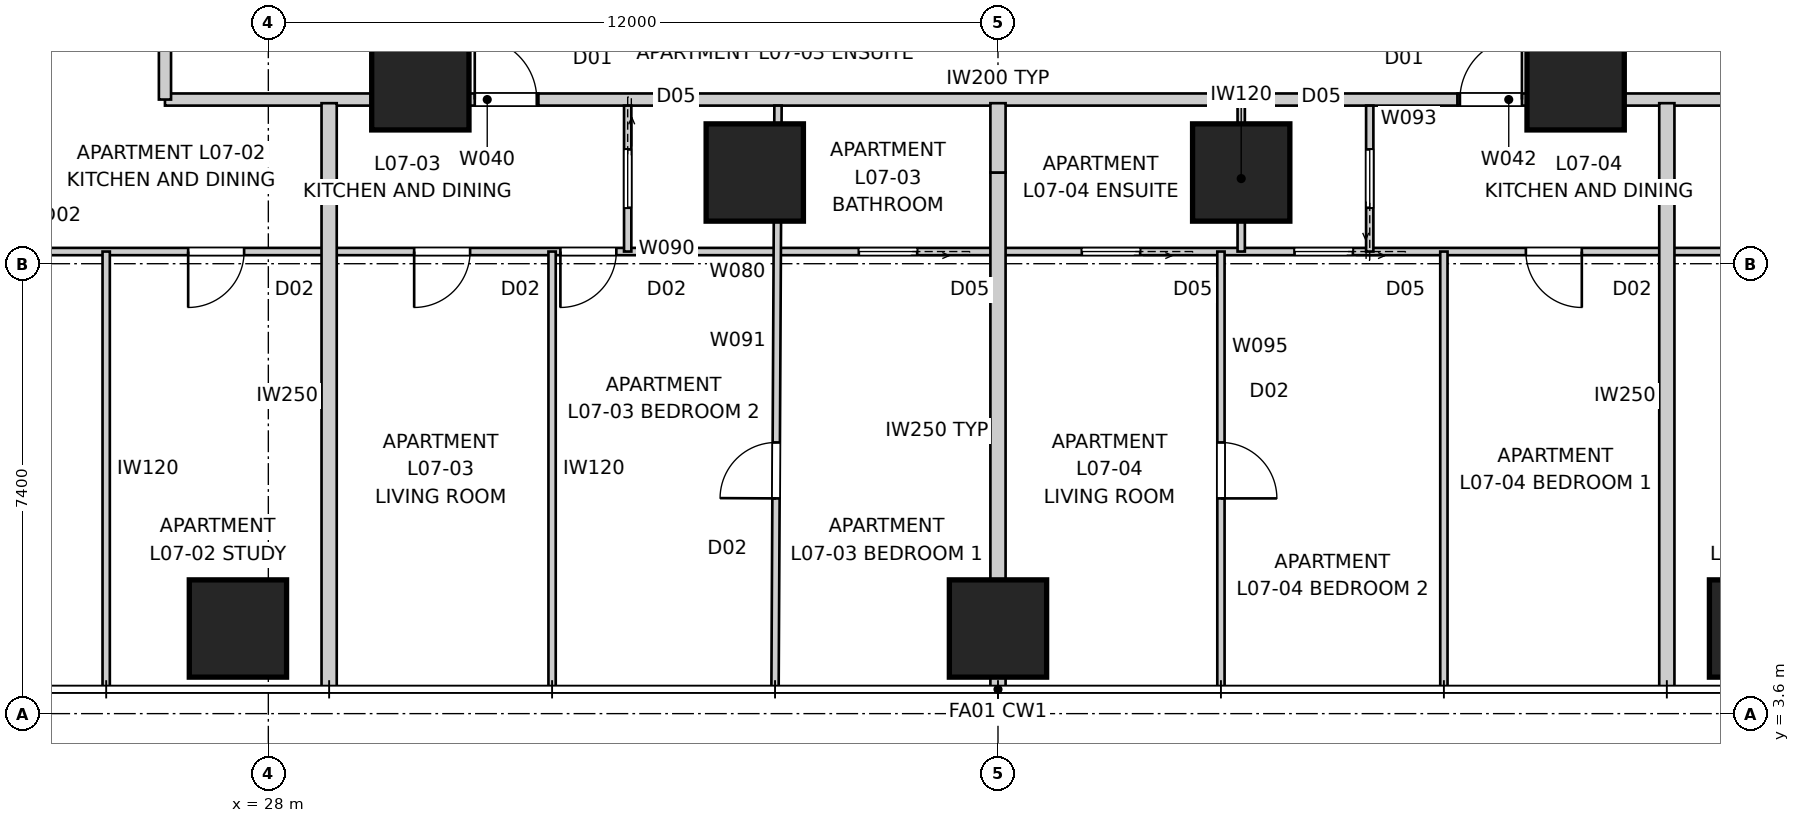
"""IFC4 building model, lengths in metres.
Left out: names, types, materials, properties, quantities, classifications, styles, units other than length and angle.
Written with IfcOpenShell. Run it as: python <this file> out.ifc"""

import sys

from ifc_helpers import new_model, si_unit, direction, frame, frame_2d, origin, origin_2d, place, context, subcontext, project, spatial, rectangle, extrude, element, fill, save


model = new_model("IFC4")
c1 = context("Model", 3, precision=1e-05, world=origin(), true_north=direction((0.0, 1.0)))
c2 = subcontext(c1, "Body", "Model", "MODEL_VIEW")
j1 = project(units=[si_unit("LENGTHUNIT", "METRE"), si_unit("PLANEANGLEUNIT", "RADIAN")], contexts=[c1])
p1 = place(None, origin())
s1 = spatial("IfcSite", under=j1, at=p1, CompositionType="ELEMENT")
p2 = place(p1, origin())
s2 = spatial("IfcBuilding", under=s1, at=p2, CompositionType="ELEMENT")
p3 = place(p2, frame((0.0, 0.0, 28.6)))
s3 = spatial("IfcBuildingStorey", under=s2, at=p3, CompositionType="ELEMENT", Elevation=28.6)
for number, where, z_axis, x_axis in (
    (1, (27.5, 5.0, 0.0), (0.0, 0.0, 1.0), (1.0, 0.0, 0.0)),
    (2, (40.0, 5.0, 0.0), (0.0, 0.0, 1.0), (1.0, 0.0, 0.0)),
    (3, (52.5, 5.0, 0.0), (0.0, 0.0, 1.0), (1.0, 0.0, 0.0)),
    (4, (30.5, 14.0, 0.0), (0.0, 0.0, 1.0), (1.0, 0.0, 0.0)),
    (5, (36.0, 12.5, 0.0), (0.0, 0.0, 1.0), (1.0, 0.0, 0.0)),
    (6, (44.0, 12.5, 0.0), (0.0, 0.0, 1.0), (1.0, 0.0, 0.0)),
    (7, (49.5, 14.0, 0.0), (0.0, 0.0, 1.0), (1.0, 0.0, 0.0)),
):
    element("IfcColumn", number, at=place(p3, frame(where, z_axis=z_axis, x_axis=x_axis)), inside=s3, PredefinedType="COLUMN", context=c2, shape_type="SweptSolid", body=[
        extrude(rectangle(XDim=1.6, YDim=1.6, at=origin_2d()), origin(), (0.0, 0.0, 1.0), 3.4),
    ])
p4 = place(p3, frame((26.3, 13.7, 0.0), z_axis=(0.0, 0.0, 1.0), x_axis=(1.0, 0.0, 0.0)))
e8 = element("IfcWall", 8, at=p4, inside=s3, PredefinedType="PARTITIONING", context=c2, shape_type="SweptSolid", body=[
    extrude(rectangle(XDim=4.458, YDim=0.2, at=frame_2d((2.229, 0.0))), origin(), (0.0, 0.0, 1.0), 3.25),
])
p5 = place(p3, frame((30.758, 13.7, 0.0), z_axis=(0.0, 0.0, 1.0), x_axis=(1.0, 0.0, 0.0)))
e9 = element("IfcWall", 9, at=p5, inside=s3, PredefinedType="PARTITIONING", context=c2, shape_type="SweptSolid", body=[
    extrude(rectangle(XDim=1.683, YDim=0.2, at=frame_2d((0.842, 0.0))), origin(), (0.0, 0.0, 1.0), 2.55),
])
p6 = place(p5, frame((0.637, 0.0, 0.0)))
e10 = element("IfcOpeningElement", 10, at=p6, cuts=e9, PredefinedType="OPENING", context=c2, shape_type="SweptSolid", body=[
    extrude(rectangle(XDim=1.02, YDim=2.34, at=frame_2d((0.51, 1.17))), frame((0.0, 0.11, 0.0), z_axis=(0.0, -1.0, 0.0), x_axis=(1.0, 0.0, 0.0)), (0.0, 0.0, 1.0), 0.22),
])
p7 = place(p3, frame((32.442, 13.7, 0.0), z_axis=(0.0, 0.0, 1.0), x_axis=(1.0, 0.0, 0.0)))
e11 = element("IfcWall", 11, at=p7, inside=s3, PredefinedType="PARTITIONING", context=c2, shape_type="SweptSolid", body=[
    extrude(rectangle(XDim=15.117, YDim=0.2, at=frame_2d((7.558, 0.0))), origin(), (0.0, 0.0, 1.0), 3.25),
])
p8 = place(p3, frame((47.558, 13.7, 0.0), z_axis=(0.0, 0.0, 1.0), x_axis=(1.0, 0.0, 0.0)))
e12 = element("IfcWall", 12, at=p8, inside=s3, PredefinedType="PARTITIONING", context=c2, shape_type="SweptSolid", body=[
    extrude(rectangle(XDim=1.683, YDim=0.2, at=frame_2d((0.842, 0.0))), origin(), (0.0, 0.0, 1.0), 2.55),
])
p9 = place(p8, frame((0.039, 0.0, 0.0)))
e13 = element("IfcOpeningElement", 13, at=p9, cuts=e12, PredefinedType="OPENING", context=c2, shape_type="SweptSolid", body=[
    extrude(rectangle(XDim=1.02, YDim=2.34, at=frame_2d((0.51, 1.17))), frame((0.0, 0.11, 0.0), z_axis=(0.0, -1.0, 0.0), x_axis=(1.0, 0.0, 0.0)), (0.0, 0.0, 1.0), 0.22),
])
p10 = place(p3, frame((49.242, 13.7, 0.0), z_axis=(0.0, 0.0, 1.0), x_axis=(1.0, 0.0, 0.0)))
e14 = element("IfcWall", 14, at=p10, inside=s3, PredefinedType="PARTITIONING", context=c2, shape_type="SweptSolid", body=[
    extrude(rectangle(XDim=4.458, YDim=0.2, at=frame_2d((2.229, 0.0))), origin(), (0.0, 0.0, 1.0), 3.25),
])
p11 = place(p3, frame((26.3, 46.3, 0.0), z_axis=(0.0, 0.0, 1.0), x_axis=(0.0, -1.0, 0.0)))
e15 = element("IfcWall", 15, at=p11, inside=s3, PredefinedType="PARTITIONING", context=c2, shape_type="SweptSolid", body=[
    extrude(rectangle(XDim=32.6, YDim=0.2, at=frame_2d((16.3, 0.0))), origin(), (0.0, 0.0, 1.0), 3.25),
])
p12 = place(p11, frame((2.315, 0.0, 0.0)))
e16 = element("IfcOpeningElement", 16, at=p12, cuts=e15, PredefinedType="OPENING", context=c2, shape_type="SweptSolid", body=[
    extrude(rectangle(XDim=1.02, YDim=2.34, at=frame_2d((0.51, 1.17))), frame((0.0, 0.11, 0.0), z_axis=(0.0, -1.0, 0.0), x_axis=(1.0, 0.0, 0.0)), (0.0, 0.0, 1.0), 0.22),
])
p13 = place(p11, frame((10.624, 0.0, 0.0)))
e17 = element("IfcOpeningElement", 17, at=p13, cuts=e15, PredefinedType="OPENING", context=c2, shape_type="SweptSolid", body=[
    extrude(rectangle(XDim=1.02, YDim=2.34, at=frame_2d((0.51, 1.17))), frame((0.0, 0.11, 0.0), z_axis=(0.0, -1.0, 0.0), x_axis=(1.0, 0.0, 0.0)), (0.0, 0.0, 1.0), 0.22),
])
p14 = place(p11, frame((17.848, 0.0, 0.0)))
e18 = element("IfcOpeningElement", 18, at=p14, cuts=e15, PredefinedType="OPENING", context=c2, shape_type="SweptSolid", body=[
    extrude(rectangle(XDim=1.02, YDim=2.34, at=frame_2d((0.51, 1.17))), frame((0.0, 0.11, 0.0), z_axis=(0.0, -1.0, 0.0), x_axis=(1.0, 0.0, 0.0)), (0.0, 0.0, 1.0), 0.22),
])
p15 = place(p11, frame((30.516, 0.0, 0.0)))
e19 = element("IfcOpeningElement", 19, at=p15, cuts=e15, PredefinedType="OPENING", context=c2, shape_type="SweptSolid", body=[
    extrude(rectangle(XDim=1.02, YDim=2.34, at=frame_2d((0.51, 1.17))), frame((0.0, 0.11, 0.0), z_axis=(0.0, -1.0, 0.0), x_axis=(1.0, 0.0, 0.0)), (0.0, 0.0, 1.0), 0.22),
])
p16 = place(p3, frame((29.0, 4.0, 0.0), z_axis=(0.0, 0.0, 1.0), x_axis=(0.0, 1.0, 0.0)))
e20 = element("IfcWall", 20, at=p16, inside=s3, PredefinedType="PARTITIONING", context=c2, shape_type="SweptSolid", body=[
    extrude(rectangle(XDim=9.64, YDim=0.25, at=frame_2d((4.82, 0.0))), origin(), (0.0, 0.0, 1.0), 3.25),
])
p17 = place(p3, frame((40.0, 4.0, 0.0), z_axis=(0.0, 0.0, 1.0), x_axis=(0.0, 1.0, 0.0)))
e21 = element("IfcWall", 21, at=p17, inside=s3, PredefinedType="PARTITIONING", context=c2, shape_type="SweptSolid", body=[
    extrude(rectangle(XDim=8.5, YDim=0.25, at=frame_2d((4.25, 0.0))), origin(), (0.0, 0.0, 1.0), 3.25),
])
p18 = place(p3, frame((40.0, 12.5, 0.0), z_axis=(0.0, 0.0, 1.0), x_axis=(0.0, 1.0, 0.0)))
e22 = element("IfcWall", 22, at=p18, inside=s3, PredefinedType="PARTITIONING", context=c2, shape_type="SweptSolid", body=[
    extrude(rectangle(XDim=1.14, YDim=0.25, at=frame_2d((0.57, 0.0))), origin(), (0.0, 0.0, 1.0), 2.796),
])
p19 = place(p3, frame((51.0, 4.0, 0.0), z_axis=(0.0, 0.0, 1.0), x_axis=(0.0, 1.0, 0.0)))
e23 = element("IfcWall", 23, at=p19, inside=s3, PredefinedType="PARTITIONING", context=c2, shape_type="SweptSolid", body=[
    extrude(rectangle(XDim=9.64, YDim=0.25, at=frame_2d((4.82, 0.0))), origin(), (0.0, 0.0, 1.0), 3.25),
])
p20 = place(p3, frame((56.2, 11.2, 0.0), z_axis=(0.0, 0.0, 1.0), x_axis=(-1.0, 0.0, 0.0)))
e24 = element("IfcWall", 24, at=p20, inside=s3, PredefinedType="PARTITIONING", context=c2, shape_type="SweptSolid", body=[
    extrude(rectangle(XDim=32.4, YDim=0.12, at=frame_2d((16.2, 0.0))), origin(), (0.0, 0.0, 1.0), 3.25),
])
p21 = place(p20, frame((24.882, 0.0, 0.0)))
e25 = element("IfcOpeningElement", 25, at=p21, cuts=e24, PredefinedType="OPENING", context=c2, shape_type="SweptSolid", body=[
    extrude(rectangle(XDim=0.92, YDim=2.34, at=frame_2d((0.46, 1.17))), frame((0.0, 0.07, 0.0), z_axis=(0.0, -1.0, 0.0), x_axis=(1.0, 0.0, 0.0)), (0.0, 0.0, 1.0), 0.14),
])
p22 = place(p20, frame((22.477, 0.0, 0.0)))
e26 = element("IfcOpeningElement", 26, at=p22, cuts=e24, PredefinedType="OPENING", context=c2, shape_type="SweptSolid", body=[
    extrude(rectangle(XDim=0.92, YDim=2.34, at=frame_2d((0.46, 1.17))), frame((0.0, 0.07, 0.0), z_axis=(0.0, -1.0, 0.0), x_axis=(1.0, 0.0, 0.0)), (0.0, 0.0, 1.0), 0.14),
])
p23 = place(p20, frame((6.598, 0.0, 0.0)))
e27 = element("IfcOpeningElement", 27, at=p23, cuts=e24, PredefinedType="OPENING", context=c2, shape_type="SweptSolid", body=[
    extrude(rectangle(XDim=0.92, YDim=2.34, at=frame_2d((0.46, 1.17))), frame((0.0, 0.07, 0.0), z_axis=(0.0, -1.0, 0.0), x_axis=(1.0, 0.0, 0.0)), (0.0, 0.0, 1.0), 0.14),
])
p24 = place(p20, frame((28.598, 0.0, 0.0)))
e28 = element("IfcOpeningElement", 28, at=p24, cuts=e24, PredefinedType="OPENING", context=c2, shape_type="SweptSolid", body=[
    extrude(rectangle(XDim=0.92, YDim=2.34, at=frame_2d((0.46, 1.17))), frame((0.0, 0.07, 0.0), z_axis=(0.0, -1.0, 0.0), x_axis=(1.0, 0.0, 0.0)), (0.0, 0.0, 1.0), 0.14),
])
p25 = place(p20, frame((2.862, 0.0, 0.0)))
e29 = element("IfcOpeningElement", 29, at=p25, cuts=e24, PredefinedType="OPENING", context=c2, shape_type="SweptSolid", body=[
    extrude(rectangle(XDim=0.96, YDim=2.1, at=frame_2d((0.48, 1.05))), frame((0.0, 0.07, 0.0), z_axis=(0.0, -1.0, 0.0), x_axis=(1.0, 0.0, 0.0)), (0.0, 0.0, 1.0), 0.14),
])
p26 = place(p20, frame((10.363, 0.0, 0.0)))
e30 = element("IfcOpeningElement", 30, at=p26, cuts=e24, PredefinedType="OPENING", context=c2, shape_type="SweptSolid", body=[
    extrude(rectangle(XDim=0.96, YDim=2.1, at=frame_2d((0.48, 1.05))), frame((0.0, 0.07, 0.0), z_axis=(0.0, -1.0, 0.0), x_axis=(1.0, 0.0, 0.0)), (0.0, 0.0, 1.0), 0.14),
])
p27 = place(p20, frame((13.862, 0.0, 0.0)))
e31 = element("IfcOpeningElement", 31, at=p27, cuts=e24, PredefinedType="OPENING", context=c2, shape_type="SweptSolid", body=[
    extrude(rectangle(XDim=0.96, YDim=2.1, at=frame_2d((0.48, 1.05))), frame((0.0, 0.07, 0.0), z_axis=(0.0, -1.0, 0.0), x_axis=(1.0, 0.0, 0.0)), (0.0, 0.0, 1.0), 0.14),
])
p28 = place(p20, frame((17.529, 0.0, 0.0)))
e32 = element("IfcOpeningElement", 32, at=p28, cuts=e24, PredefinedType="OPENING", context=c2, shape_type="SweptSolid", body=[
    extrude(rectangle(XDim=0.96, YDim=2.1, at=frame_2d((0.48, 1.05))), frame((0.0, 0.07, 0.0), z_axis=(0.0, -1.0, 0.0), x_axis=(1.0, 0.0, 0.0)), (0.0, 0.0, 1.0), 0.14),
])
p29 = place(p3, frame((25.333, 11.2, 0.0), z_axis=(0.0, 0.0, 1.0), x_axis=(0.0, -1.0, 0.0)))
e33 = element("IfcWall", 33, at=p29, inside=s3, PredefinedType="PARTITIONING", context=c2, shape_type="SweptSolid", body=[
    extrude(rectangle(XDim=7.16, YDim=0.12, at=frame_2d((3.58, 0.0))), origin(), (0.0, 0.0, 1.0), 2.638),
])
p30 = place(p3, frame((33.91, 13.6, 0.0), z_axis=(0.0, 0.0, 1.0), x_axis=(0.0, -1.0, 0.0)))
e34 = element("IfcWall", 34, at=p30, inside=s3, PredefinedType="PARTITIONING", context=c2, shape_type="SweptSolid", body=[
    extrude(rectangle(XDim=2.4, YDim=0.12, at=frame_2d((1.2, 0.0))), origin(), (0.0, 0.0, 1.0), 3.25),
])
p31 = place(p30, frame((0.72, 0.0, 0.0)))
e35 = element("IfcOpeningElement", 35, at=p31, cuts=e34, PredefinedType="OPENING", context=c2, shape_type="SweptSolid", body=[
    extrude(rectangle(XDim=0.96, YDim=2.1, at=frame_2d((0.48, 1.05))), frame((0.0, 0.07, 0.0), z_axis=(0.0, -1.0, 0.0), x_axis=(1.0, 0.0, 0.0)), (0.0, 0.0, 1.0), 0.14),
])
p32 = place(p3, frame((36.333, 4.04, 0.0), z_axis=(0.0, 0.0, 1.0), x_axis=(0.005107446534, 0.99998695691, 0.0)))
e36 = element("IfcWall", 36, at=p32, inside=s3, PredefinedType="PARTITIONING", context=c2, shape_type="SweptSolid", body=[
    extrude(rectangle(XDim=9.56, YDim=0.12, at=frame_2d((4.78, 0.0))), origin(), (0.0, 0.0, 1.0), 3.25),
])
p33 = place(p32, frame((3.1, 0.0, 0.0)))
e37 = element("IfcOpeningElement", 37, at=p33, cuts=e36, PredefinedType="OPENING", context=c2, shape_type="SweptSolid", body=[
    extrude(rectangle(XDim=0.92, YDim=2.34, at=frame_2d((0.46, 1.17))), frame((0.0, 0.07, 0.0), z_axis=(0.0, -1.0, 0.0), x_axis=(1.0, 0.0, 0.0)), (0.0, 0.0, 1.0), 0.14),
])
p34 = place(p3, frame((32.667, 11.2, 0.0), z_axis=(0.0, 0.0, 1.0), x_axis=(0.0, -1.0, 0.0)))
e38 = element("IfcWall", 38, at=p34, inside=s3, PredefinedType="PARTITIONING", context=c2, shape_type="SweptSolid", body=[
    extrude(rectangle(XDim=7.16, YDim=0.12, at=frame_2d((3.58, 0.0))), origin(), (0.0, 0.0, 1.0), 3.25),
])
p35 = place(p3, frame((46.114, 11.2, 0.0), z_axis=(0.0, 0.0, 1.0), x_axis=(0.0, 1.0, 0.0)))
e39 = element("IfcWall", 39, at=p35, inside=s3, PredefinedType="PARTITIONING", context=c2, shape_type="SweptSolid", body=[
    extrude(rectangle(XDim=2.4, YDim=0.12, at=frame_2d((1.2, 0.0))), origin(), (0.0, 0.0, 1.0), 3.25),
])
p36 = place(p35, frame((0.72, 0.0, 0.0)))
e40 = element("IfcOpeningElement", 40, at=p36, cuts=e39, PredefinedType="OPENING", context=c2, shape_type="SweptSolid", body=[
    extrude(rectangle(XDim=0.96, YDim=2.1, at=frame_2d((0.48, 1.05))), frame((0.0, 0.07, 0.0), z_axis=(0.0, -1.0, 0.0), x_axis=(1.0, 0.0, 0.0)), (0.0, 0.0, 1.0), 0.14),
])
p37 = place(p3, frame((44.0, 11.2, 0.0), z_axis=(0.0, 0.0, 1.0), x_axis=(0.0, 1.0, 0.0)))
e41 = element("IfcWall", 41, at=p37, inside=s3, PredefinedType="PARTITIONING", context=c2, shape_type="SweptSolid", body=[
    extrude(rectangle(XDim=2.4, YDim=0.12, at=frame_2d((1.2, 0.0))), origin(), (0.0, 0.0, 1.0), 3.25),
])
p38 = place(p3, frame((43.667, 11.2, 0.0), z_axis=(0.0, 0.0, 1.0), x_axis=(0.0, -1.0, 0.0)))
e42 = element("IfcWall", 42, at=p38, inside=s3, PredefinedType="PARTITIONING", context=c2, shape_type="SweptSolid", body=[
    extrude(rectangle(XDim=7.16, YDim=0.12, at=frame_2d((3.58, 0.0))), origin(), (0.0, 0.0, 1.0), 3.25),
])
p39 = place(p38, frame((3.14, 0.0, 0.0)))
e43 = element("IfcOpeningElement", 43, at=p39, cuts=e42, PredefinedType="OPENING", context=c2, shape_type="SweptSolid", body=[
    extrude(rectangle(XDim=0.92, YDim=2.34, at=frame_2d((0.46, 1.17))), frame((0.0, 0.07, 0.0), z_axis=(0.0, -1.0, 0.0), x_axis=(1.0, 0.0, 0.0)), (0.0, 0.0, 1.0), 0.14),
])
p40 = place(p3, frame((47.333, 4.04, 0.0), z_axis=(0.0, 0.0, 1.0), x_axis=(0.0, 1.0, 0.0)))
e44 = element("IfcWall", 44, at=p40, inside=s3, PredefinedType="PARTITIONING", context=c2, shape_type="SweptSolid", body=[
    extrude(rectangle(XDim=7.16, YDim=0.12, at=frame_2d((3.58, 0.0))), origin(), (0.0, 0.0, 1.0), 3.25),
])
p41 = place(p6, origin())
e45 = element("IfcDoor", 45, at=p41, inside=s3, OperationType="SINGLE_SWING_LEFT", PredefinedType="DOOR", context=c2, shape_type="SweptSolid", body=[
    extrude(rectangle(XDim=1.02, YDim=2.34, at=frame_2d((0.51, 1.17))), frame((0.0, 0.025, 0.0), z_axis=(0.0, -1.0, 0.0), x_axis=(1.0, 0.0, 0.0)), (0.0, 0.0, 1.0), 0.05),
])
fill(e10, e45)
p42 = place(p9, origin())
e46 = element("IfcDoor", 46, at=p42, inside=s3, OperationType="SINGLE_SWING_RIGHT", PredefinedType="DOOR", context=c2, shape_type="SweptSolid", body=[
    extrude(rectangle(XDim=1.02, YDim=2.34, at=frame_2d((0.51, 1.17))), frame((0.0, 0.025, 0.0), z_axis=(0.0, -1.0, 0.0), x_axis=(1.0, 0.0, 0.0)), (0.0, 0.0, 1.0), 0.05),
])
fill(e13, e46)
p43 = place(p21, origin())
e47 = element("IfcDoor", 47, at=p43, inside=s3, OperationType="SINGLE_SWING_RIGHT", PredefinedType="DOOR", context=c2, shape_type="SweptSolid", body=[
    extrude(rectangle(XDim=0.92, YDim=2.34, at=frame_2d((0.46, 1.17))), frame((0.0, 0.025, 0.0), z_axis=(0.0, -1.0, 0.0), x_axis=(1.0, 0.0, 0.0)), (0.0, 0.0, 1.0), 0.05),
])
fill(e25, e47)
p44 = place(p31, origin())
e48 = element("IfcDoor", 48, at=p44, inside=s3, OperationType="SLIDING_TO_LEFT", PredefinedType="DOOR", context=c2, shape_type="SweptSolid", body=[
    extrude(rectangle(XDim=0.96, YDim=2.1, at=frame_2d((0.48, 1.05))), frame((0.0, 0.025, 0.0), z_axis=(0.0, -1.0, 0.0), x_axis=(1.0, 0.0, 0.0)), (0.0, 0.0, 1.0), 0.05),
])
fill(e35, e48)
p45 = place(p22, origin())
e49 = element("IfcDoor", 49, at=p45, inside=s3, OperationType="SINGLE_SWING_RIGHT", PredefinedType="DOOR", context=c2, shape_type="SweptSolid", body=[
    extrude(rectangle(XDim=0.92, YDim=2.34, at=frame_2d((0.46, 1.17))), frame((0.0, 0.025, 0.0), z_axis=(0.0, -1.0, 0.0), x_axis=(1.0, 0.0, 0.0)), (0.0, 0.0, 1.0), 0.05),
])
fill(e26, e49)
p46 = place(p23, origin())
e50 = element("IfcDoor", 50, at=p46, inside=s3, OperationType="SINGLE_SWING_LEFT", PredefinedType="DOOR", context=c2, shape_type="SweptSolid", body=[
    extrude(rectangle(XDim=0.92, YDim=2.34, at=frame_2d((0.46, 1.17))), frame((0.0, 0.025, 0.0), z_axis=(0.0, -1.0, 0.0), x_axis=(1.0, 0.0, 0.0)), (0.0, 0.0, 1.0), 0.05),
])
fill(e27, e50)
p47 = place(p36, origin())
e51 = element("IfcDoor", 51, at=p47, inside=s3, OperationType="SLIDING_TO_LEFT", PredefinedType="DOOR", context=c2, shape_type="SweptSolid", body=[
    extrude(rectangle(XDim=0.96, YDim=2.1, at=frame_2d((0.48, 1.05))), frame((0.0, 0.025, 0.0), z_axis=(0.0, -1.0, 0.0), x_axis=(1.0, 0.0, 0.0)), (0.0, 0.0, 1.0), 0.05),
])
fill(e40, e51)
p48 = place(p24, origin())
e52 = element("IfcDoor", 52, at=p48, inside=s3, OperationType="SINGLE_SWING_RIGHT", PredefinedType="DOOR", context=c2, shape_type="SweptSolid", body=[
    extrude(rectangle(XDim=0.92, YDim=2.34, at=frame_2d((0.46, 1.17))), frame((0.0, 0.025, 0.0), z_axis=(0.0, -1.0, 0.0), x_axis=(1.0, 0.0, 0.0)), (0.0, 0.0, 1.0), 0.05),
])
fill(e28, e52)
p49 = place(p26, origin())
e53 = element("IfcDoor", 53, at=p49, inside=s3, OperationType="SLIDING_TO_LEFT", PredefinedType="DOOR", context=c2, shape_type="SweptSolid", body=[
    extrude(rectangle(XDim=0.96, YDim=2.1, at=frame_2d((0.48, 1.05))), frame((0.0, 0.025, 0.0), z_axis=(0.0, -1.0, 0.0), x_axis=(1.0, 0.0, 0.0)), (0.0, 0.0, 1.0), 0.05),
])
fill(e30, e53)
p50 = place(p33, origin())
e54 = element("IfcDoor", 54, at=p50, inside=s3, OperationType="SINGLE_SWING_LEFT", PredefinedType="DOOR", context=c2, shape_type="SweptSolid", body=[
    extrude(rectangle(XDim=0.92, YDim=2.34, at=frame_2d((0.46, 1.17))), frame((0.0, 0.025, 0.0), z_axis=(0.0, -1.0, 0.0), x_axis=(1.0, 0.0, 0.0)), (0.0, 0.0, 1.0), 0.05),
])
fill(e37, e54)
p51 = place(p39, origin())
e55 = element("IfcDoor", 55, at=p51, inside=s3, OperationType="SINGLE_SWING_RIGHT", PredefinedType="DOOR", context=c2, shape_type="SweptSolid", body=[
    extrude(rectangle(XDim=0.92, YDim=2.34, at=frame_2d((0.46, 1.17))), frame((0.0, 0.025, 0.0), z_axis=(0.0, -1.0, 0.0), x_axis=(1.0, 0.0, 0.0)), (0.0, 0.0, 1.0), 0.05),
])
fill(e43, e55)
p52 = place(p27, origin())
e56 = element("IfcDoor", 56, at=p52, inside=s3, OperationType="SLIDING_TO_LEFT", PredefinedType="DOOR", context=c2, shape_type="SweptSolid", body=[
    extrude(rectangle(XDim=0.96, YDim=2.1, at=frame_2d((0.48, 1.05))), frame((0.0, 0.025, 0.0), z_axis=(0.0, -1.0, 0.0), x_axis=(1.0, 0.0, 0.0)), (0.0, 0.0, 1.0), 0.05),
])
fill(e31, e56)
p53 = place(p28, origin())
e57 = element("IfcDoor", 57, at=p53, inside=s3, OperationType="SLIDING_TO_LEFT", PredefinedType="DOOR", context=c2, shape_type="SweptSolid", body=[
    extrude(rectangle(XDim=0.96, YDim=2.1, at=frame_2d((0.48, 1.05))), frame((0.0, 0.025, 0.0), z_axis=(0.0, -1.0, 0.0), x_axis=(1.0, 0.0, 0.0)), (0.0, 0.0, 1.0), 0.05),
])
fill(e32, e57)
save(model, sys.argv[1])
